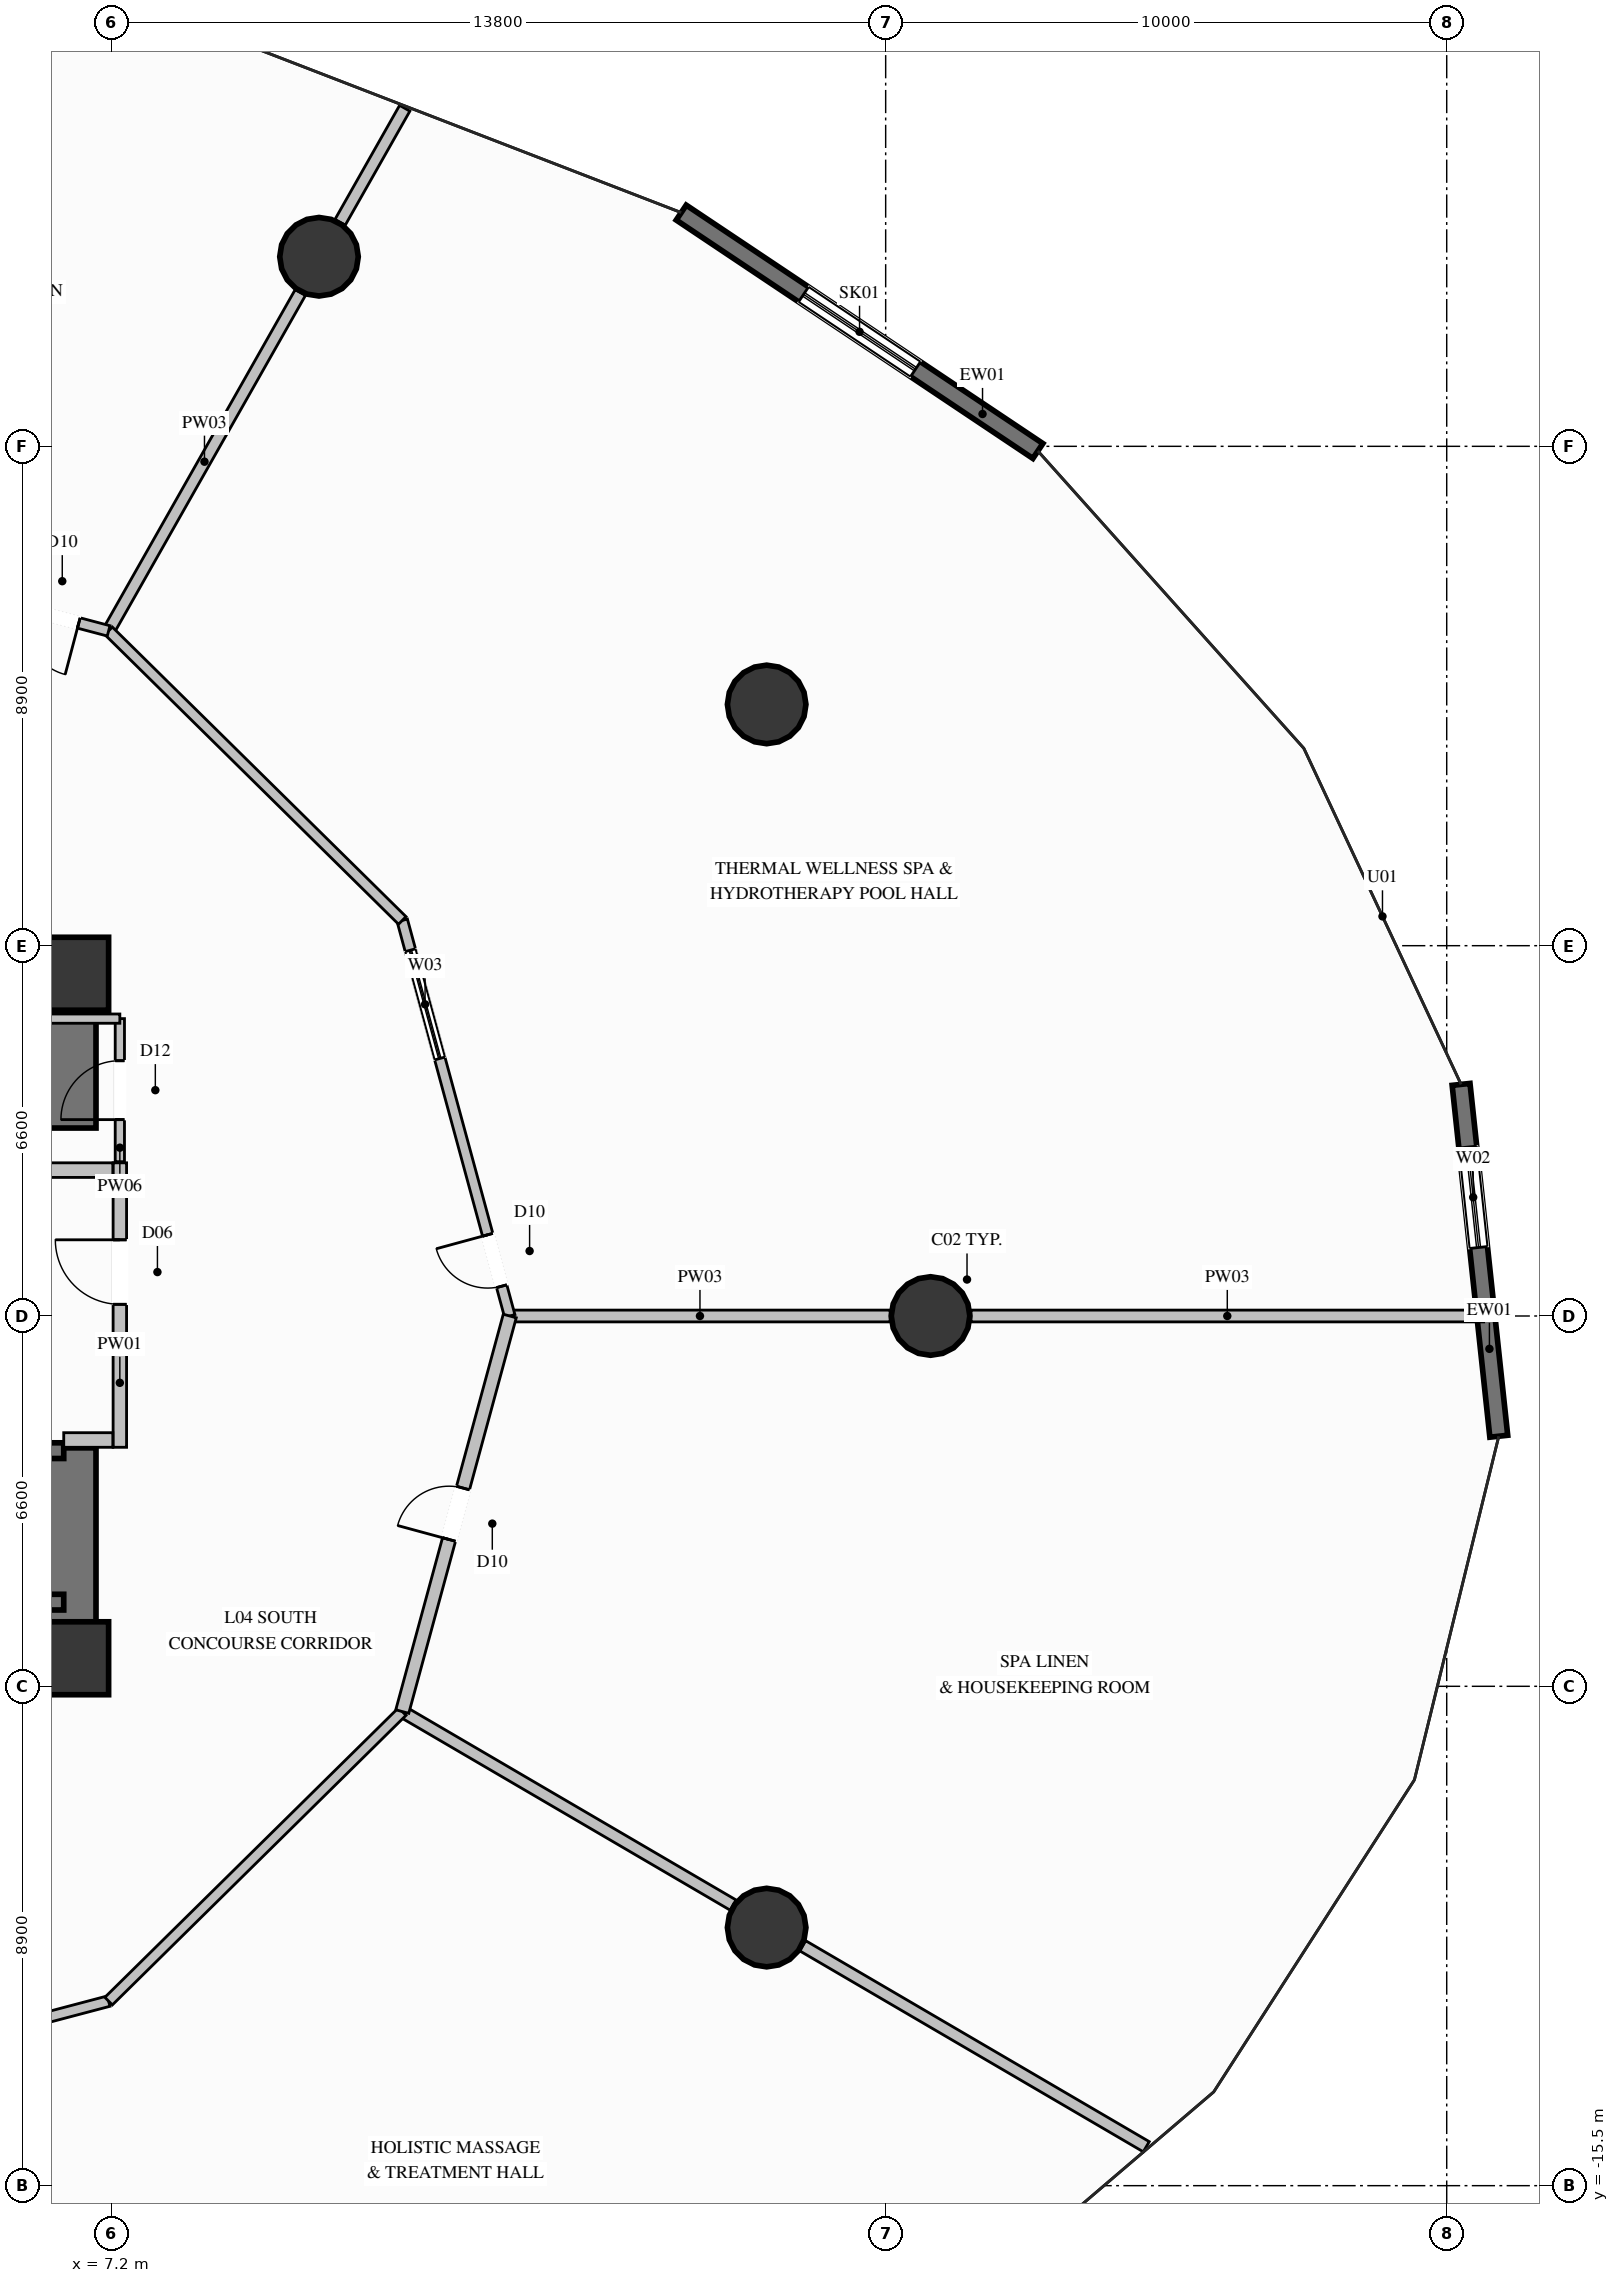
"""IFC4 building model, lengths in metres.
Left out: names, types, materials, properties, quantities, classifications, styles, units other than length and angle.
Written with IfcOpenShell. Run it as: python <this file> out.ifc"""

import sys

from ifc_helpers import new_model, si_unit, direction, frame, frame_2d, origin, origin_2d, place, context, subcontext, project, spatial, rectangle, circle, extrude, element, fill, save


model = new_model("IFC4")
c1 = context("Model", 3, precision=1e-05, world=origin(), true_north=direction((0.0, 1.0)))
c2 = subcontext(c1, "Body", "Model", "MODEL_VIEW")
j1 = project(units=[si_unit("LENGTHUNIT", "METRE"), si_unit("PLANEANGLEUNIT", "RADIAN")], contexts=[c1])
p1 = place(None, origin())
s1 = spatial("IfcSite", under=j1, at=p1, CompositionType="ELEMENT")
p2 = place(p1, origin())
s2 = spatial("IfcBuilding", under=s1, at=p2, CompositionType="ELEMENT")
p3 = place(p2, frame((0.0, 0.0, 23.6)))
s3 = spatial("IfcBuildingStorey", under=s2, at=p3, CompositionType="ELEMENT", Elevation=23.6)
for number, where, z_axis, x_axis in (
    (1, (6.5, -6.1, 0.0), (0.0, 0.0, 1.0), (1.0, 0.0, 0.0)),
    (2, (6.5, 6.1, 0.0), (0.0, 0.0, 1.0), (1.0, 0.0, 0.0)),
):
    element("IfcColumn", number, at=place(p3, frame(where, z_axis=z_axis, x_axis=x_axis)), inside=s3, PredefinedType="COLUMN", context=c2, shape_type="SweptSolid", body=[
        extrude(rectangle(XDim=1.3, YDim=1.3, at=origin_2d()), origin(), (0.0, 0.0, 1.0), 4.8),
    ])
p4 = place(p3, frame((6.5, -6.525, 0.0), z_axis=(0.0, 0.0, 1.0), x_axis=(0.0, 1.0, 0.0)))
e3 = element("IfcWall", 3, at=p4, inside=s3, PredefinedType="SHEAR", context=c2, shape_type="SweptSolid", body=[
    extrude(rectangle(XDim=4.175, YDim=0.85, at=frame_2d((2.087, 0.0))), origin(), (0.0, 0.0, 1.0), 4.8),
])
p5 = place(p3, frame((6.5, 3.35, 0.0), z_axis=(0.0, 0.0, 1.0), x_axis=(0.0, 1.0, 0.0)))
e4 = element("IfcWall", 4, at=p5, inside=s3, PredefinedType="SHEAR", context=c2, shape_type="SweptSolid", body=[
    extrude(rectangle(XDim=3.175, YDim=0.85, at=frame_2d((1.587, 0.0))), origin(), (0.0, 0.0, 1.0), 4.8),
])
for number, where, z_axis, x_axis in (
    (5, (21.8, 0.0, 0.0), (0.0, 0.0, 1.0), (1.0, 0.0, 0.0)),
    (6, (18.879, 10.9, 0.0), (0.0, 0.0, 1.0), (1.0, 0.0, 0.0)),
    (7, (10.9, 18.879, 0.0), (0.0, 0.0, 1.0), (1.0, 0.0, 0.0)),
    (8, (18.879, -10.9, 0.0), (0.0, 0.0, 1.0), (1.0, 0.0, 0.0)),
):
    element("IfcColumn", number, at=place(p3, frame(where, z_axis=z_axis, x_axis=x_axis)), inside=s3, PredefinedType="COLUMN", context=c2, shape_type="SweptSolid", body=[
        extrude(circle(Radius=0.7, at=origin_2d()), origin(), (0.0, 0.0, 1.0), 4.8),
    ])
p6 = place(p3, frame((31.256, 4.128, 0.0), z_axis=(0.0, 0.0, 1.0), x_axis=(0.106530390003, -0.994309446805, 0.0)))
e9 = element("IfcWall", 9, at=p6, inside=s3, PredefinedType="SOLIDWALL", context=c2, shape_type="SweptSolid", body=[
    extrude(rectangle(XDim=6.307, YDim=0.32, at=frame_2d((3.153, 0.0))), origin(), (0.0, 0.0, 1.0), 4.54),
])
p7 = place(p6, frame((1.124, 0.0, 0.65)))
e10 = element("IfcOpeningElement", 10, at=p7, cuts=e9, PredefinedType="OPENING", context=c2, shape_type="SweptSolid", body=[
    extrude(rectangle(XDim=1.8, YDim=2.6, at=frame_2d((0.9, 1.3))), frame((0.0, 0.17, 0.0), z_axis=(0.0, -1.0, 0.0), x_axis=(1.0, 0.0, 0.0)), (0.0, 0.0, 1.0), 0.34),
])
p8 = place(p3, frame((17.356, 19.666, 0.0), z_axis=(0.0, 0.0, 1.0), x_axis=(0.831381626456, -0.555701890577, 0.0)))
e11 = element("IfcWall", 11, at=p8, inside=s3, PredefinedType="SOLIDWALL", context=c2, shape_type="SweptSolid", body=[
    extrude(rectangle(XDim=7.646, YDim=0.32, at=frame_2d((3.823, 0.0))), origin(), (0.0, 0.0, 1.0), 4.54),
])
p9 = place(p8, frame((2.623, 0.0, 0.6)))
e12 = element("IfcOpeningElement", 12, at=p9, cuts=e11, PredefinedType="OPENING", context=c2, shape_type="SweptSolid", body=[
    extrude(rectangle(XDim=2.4, YDim=3.0, at=frame_2d((1.2, 1.5))), frame((0.0, 0.17, 0.0), z_axis=(0.0, -1.0, 0.0), x_axis=(1.0, 0.0, 0.0)), (0.0, 0.0, 1.0), 0.34),
])
p10 = place(p3, frame((4.15, -5.1, 0.0), z_axis=(0.0, 0.0, 1.0), x_axis=(1.0, 0.0, 0.0)))
e13 = element("IfcWall", 13, at=p10, inside=s3, PredefinedType="SOLIDWALL", context=c2, shape_type="SweptSolid", body=[
    extrude(rectangle(XDim=2.2, YDim=0.28, at=frame_2d((1.1, 0.0))), origin(), (0.0, 0.0, 1.0), 4.54),
])
p11 = place(p3, frame((6.35, -2.4, 0.0), z_axis=(0.0, 0.0, 1.0), x_axis=(-1.0, 0.0, 0.0)))
e14 = element("IfcWall", 14, at=p11, inside=s3, PredefinedType="SOLIDWALL", context=c2, shape_type="SweptSolid", body=[
    extrude(rectangle(XDim=2.2, YDim=0.28, at=frame_2d((1.1, 0.0))), origin(), (0.0, 0.0, 1.0), 4.54),
])
p12 = place(p11, frame((0.5, 0.0, 0.0)))
e15 = element("IfcOpeningElement", 15, at=p12, cuts=e14, PredefinedType="OPENING", context=c2, shape_type="SweptSolid", body=[
    extrude(rectangle(XDim=1.2, YDim=2.2, at=frame_2d((0.6, 1.1))), frame((0.0, 0.15, 0.0), z_axis=(0.0, -1.0, 0.0), x_axis=(1.0, 0.0, 0.0)), (0.0, 0.0, 1.0), 0.3),
])
p13 = place(p3, frame((7.35, -2.34, 0.0), z_axis=(0.0, 0.0, 1.0), x_axis=(0.0, 1.0, 0.0)))
e16 = element("IfcWall", 16, at=p13, inside=s3, PredefinedType="PARTITIONING", context=c2, shape_type="SweptSolid", body=[
    extrude(rectangle(XDim=5.07, YDim=0.24, at=frame_2d((2.535, 0.0))), origin(), (0.0, 0.0, 1.0), 2.725),
])
p14 = place(p13, frame((2.548, 0.0, 0.0)))
e17 = element("IfcOpeningElement", 17, at=p14, cuts=e16, PredefinedType="OPENING", context=c2, shape_type="SweptSolid", body=[
    extrude(rectangle(XDim=1.15, YDim=2.2, at=frame_2d((0.575, 1.1))), frame((0.0, 0.13, 0.0), z_axis=(0.0, -1.0, 0.0), x_axis=(1.0, 0.0, 0.0)), (0.0, 0.0, 1.0), 0.26),
])
p15 = place(p3, frame((6.35, -2.21, 0.0), z_axis=(0.0, 0.0, 1.0), x_axis=(1.0, 0.0, 0.0)))
e18 = element("IfcWall", 18, at=p15, inside=s3, PredefinedType="PARTITIONING", context=c2, shape_type="SweptSolid", body=[
    extrude(rectangle(XDim=0.875, YDim=0.26, at=frame_2d((0.438, 0.0))), origin(), (0.0, 0.0, 1.0), 4.54),
])
p16 = place(p3, frame((4.13, 2.6, 0.0), z_axis=(0.0, 0.0, 1.0), x_axis=(1.0, 0.0, 0.0)))
e19 = element("IfcWall", 19, at=p16, inside=s3, PredefinedType="PARTITIONING", context=c2, shape_type="SweptSolid", body=[
    extrude(rectangle(XDim=3.095, YDim=0.26, at=frame_2d((1.548, 0.0))), origin(), (0.0, 0.0, 1.0), 4.54),
])
p17 = place(p3, frame((7.35, 2.75, 0.0), z_axis=(0.0, 0.0, 1.0), x_axis=(0.0, 1.0, 0.0)))
e20 = element("IfcWall", 20, at=p17, inside=s3, PredefinedType="PARTITIONING", context=c2, shape_type="SweptSolid", body=[
    extrude(rectangle(XDim=2.55, YDim=0.165, at=frame_2d((1.275, 0.0))), origin(), (0.0, 0.0, 1.0), 2.725),
])
p18 = place(p17, frame((0.75, 0.0, 0.0)))
e21 = element("IfcOpeningElement", 21, at=p18, cuts=e20, PredefinedType="OPENING", context=c2, shape_type="SweptSolid", body=[
    extrude(rectangle(XDim=1.05, YDim=2.15, at=frame_2d((0.525, 1.075))), frame((0.0, 0.093, 0.0), z_axis=(0.0, -1.0, 0.0), x_axis=(1.0, 0.0, 0.0)), (0.0, 0.0, 1.0), 0.185),
])
p19 = place(p3, frame((7.35, 5.3, 0.0), z_axis=(0.0, 0.0, 1.0), x_axis=(-1.0, 0.0, 0.0)))
e22 = element("IfcWall", 22, at=p19, inside=s3, PredefinedType="PARTITIONING", context=c2, shape_type="SweptSolid", body=[
    extrude(rectangle(XDim=1.5, YDim=0.165, at=frame_2d((0.75, 0.0))), origin(), (0.0, 0.0, 1.0), 2.725),
])
p20 = place(p3, frame((14.3, 0.0, 0.0), z_axis=(0.0, 0.0, 1.0), x_axis=(1.0, 0.0, 0.0)))
e23 = element("IfcWall", 23, at=p20, inside=s3, PredefinedType="PARTITIONING", context=c2, shape_type="SweptSolid", body=[
    extrude(rectangle(XDim=6.78, YDim=0.21, at=frame_2d((3.39, 0.0))), origin(), (0.0, 0.0, 1.0), 2.725),
])
p21 = place(p3, frame((22.52, 0.0, 0.0), z_axis=(0.0, 0.0, 1.0), x_axis=(1.0, 0.0, 0.0)))
e24 = element("IfcWall", 24, at=p21, inside=s3, PredefinedType="PARTITIONING", context=c2, shape_type="SweptSolid", body=[
    extrude(rectangle(XDim=9.138, YDim=0.21, at=frame_2d((4.569, 0.0))), origin(), (0.0, 0.0, 1.0), 4.54),
])
p22 = place(p3, frame((7.15, 12.211, 0.0), z_axis=(0.0, 0.0, 1.0), x_axis=(0.493009905658, 0.87002369676, 0.0)))
e25 = element("IfcWall", 25, at=p22, inside=s3, PredefinedType="PARTITIONING", context=c2, shape_type="SweptSolid", body=[
    extrude(rectangle(XDim=6.931, YDim=0.21, at=frame_2d((3.465, 0.0))), origin(), (0.0, 0.0, 1.0), 2.725),
])
p23 = place(p3, frame((11.276, 19.493, 0.0), z_axis=(0.0, 0.0, 1.0), x_axis=(0.493041569547, 0.870005753256, 0.0)))
e26 = element("IfcWall", 26, at=p23, inside=s3, PredefinedType="PARTITIONING", context=c2, shape_type="SweptSolid", body=[
    extrude(rectangle(XDim=2.337, YDim=0.21, at=frame_2d((1.168, 0.0))), origin(), (0.0, 0.0, 1.0), 4.54),
])
p24 = place(p3, frame((12.384, -7.05, 0.0), z_axis=(0.0, 0.0, 1.0), x_axis=(0.863200238908, -0.504861711313, 0.0)))
e27 = element("IfcWall", 27, at=p24, inside=s3, PredefinedType="PARTITIONING", context=c2, shape_type="SweptSolid", body=[
    extrude(rectangle(XDim=6.832, YDim=0.21, at=frame_2d((3.416, 0.0))), origin(), (0.0, 0.0, 1.0), 2.725),
])
p25 = place(p3, frame((19.522, -11.225, 0.0), z_axis=(0.0, 0.0, 1.0), x_axis=(0.863224110389, -0.504820894222, 0.0)))
e28 = element("IfcWall", 28, at=p25, inside=s3, PredefinedType="PARTITIONING", context=c2, shape_type="SweptSolid", body=[
    extrude(rectangle(XDim=7.093, YDim=0.21, at=frame_2d((3.547, 0.0))), origin(), (0.0, 0.0, 1.0), 4.54),
])
p26 = place(p3, frame((14.3, 0.0, 0.0), z_axis=(0.0, 0.0, 1.0), x_axis=(-0.262260528785, 0.964997106235, 0.0)))
e29 = element("IfcWall", 29, at=p26, inside=s3, PredefinedType="PARTITIONING", context=c2, shape_type="SweptSolid", body=[
    extrude(rectangle(XDim=7.306, YDim=0.19, at=frame_2d((3.653, 0.0))), origin(), (0.0, 0.0, 1.0), 4.54),
])
p27 = place(p26, frame((0.55, 0.0, 0.0)))
e30 = element("IfcOpeningElement", 30, at=p27, cuts=e29, PredefinedType="OPENING", context=c2, shape_type="SweptSolid", body=[
    extrude(rectangle(XDim=0.95, YDim=2.1, at=frame_2d((0.475, 1.05))), frame((0.0, 0.105, 0.0), z_axis=(0.0, -1.0, 0.0), x_axis=(1.0, 0.0, 0.0)), (0.0, 0.0, 1.0), 0.21),
])
p28 = place(p26, frame((4.756, 0.0, 0.9)))
e31 = element("IfcOpeningElement", 31, at=p28, cuts=e29, PredefinedType="OPENING", context=c2, shape_type="SweptSolid", body=[
    extrude(rectangle(XDim=2.0, YDim=1.6, at=frame_2d((1.0, 0.8))), frame((0.0, 0.105, 0.0), z_axis=(0.0, -1.0, 0.0), x_axis=(1.0, 0.0, 0.0)), (0.0, 0.0, 1.0), 0.21),
])
p29 = place(p3, frame((12.384, 7.05, 0.0), z_axis=(0.0, 0.0, 1.0), x_axis=(-0.712071304345, 0.702107155303, 0.0)))
e32 = element("IfcWall", 32, at=p29, inside=s3, PredefinedType="PARTITIONING", context=c2, shape_type="SweptSolid", body=[
    extrude(rectangle(XDim=7.351, YDim=0.19, at=frame_2d((3.675, 0.0))), origin(), (0.0, 0.0, 1.0), 4.54),
])
p30 = place(p3, frame((7.15, 12.211, 0.0), z_axis=(0.0, 0.0, 1.0), x_axis=(-0.966820901533, 0.255455170937, 0.0)))
e33 = element("IfcWall", 33, at=p30, inside=s3, PredefinedType="PARTITIONING", context=c2, shape_type="SweptSolid", body=[
    extrude(rectangle(XDim=7.395, YDim=0.19, at=frame_2d((3.698, 0.0))), origin(), (0.0, 0.0, 1.0), 4.54),
])
p31 = place(p30, frame((0.55, 0.0, 0.0)))
e34 = element("IfcOpeningElement", 34, at=p31, cuts=e33, PredefinedType="OPENING", context=c2, shape_type="SweptSolid", body=[
    extrude(rectangle(XDim=0.95, YDim=2.1, at=frame_2d((0.475, 1.05))), frame((0.0, 0.105, 0.0), z_axis=(0.0, -1.0, 0.0), x_axis=(1.0, 0.0, 0.0)), (0.0, 0.0, 1.0), 0.21),
])
p32 = place(p30, frame((4.845, 0.0, 0.9)))
e35 = element("IfcOpeningElement", 35, at=p32, cuts=e33, PredefinedType="OPENING", context=c2, shape_type="SweptSolid", body=[
    extrude(rectangle(XDim=2.0, YDim=1.6, at=frame_2d((1.0, 0.8))), frame((0.0, 0.105, 0.0), z_axis=(0.0, -1.0, 0.0), x_axis=(1.0, 0.0, 0.0)), (0.0, 0.0, 1.0), 0.21),
])
p33 = place(p3, frame((0.0, -14.1, 0.0), z_axis=(0.0, 0.0, 1.0), x_axis=(0.966820901533, 0.255455170937, 0.0)))
e36 = element("IfcWall", 36, at=p33, inside=s3, PredefinedType="PARTITIONING", context=c2, shape_type="SweptSolid", body=[
    extrude(rectangle(XDim=7.395, YDim=0.19, at=frame_2d((3.698, 0.0))), origin(), (0.0, 0.0, 1.0), 4.54),
])
p34 = place(p3, frame((7.15, -12.211, 0.0), z_axis=(0.0, 0.0, 1.0), x_axis=(0.712071304345, 0.702107155303, 0.0)))
e37 = element("IfcWall", 37, at=p34, inside=s3, PredefinedType="PARTITIONING", context=c2, shape_type="SweptSolid", body=[
    extrude(rectangle(XDim=7.351, YDim=0.19, at=frame_2d((3.675, 0.0))), origin(), (0.0, 0.0, 1.0), 4.54),
])
p35 = place(p3, frame((12.384, -7.05, 0.0), z_axis=(0.0, 0.0, 1.0), x_axis=(0.262260528785, 0.964997106235, 0.0)))
e38 = element("IfcWall", 38, at=p35, inside=s3, PredefinedType="PARTITIONING", context=c2, shape_type="SweptSolid", body=[
    extrude(rectangle(XDim=7.306, YDim=0.24, at=frame_2d((3.653, 0.0))), origin(), (0.0, 0.0, 1.0), 4.54),
])
p36 = place(p35, frame((3.178, 0.0, 0.0)))
e39 = element("IfcOpeningElement", 39, at=p36, cuts=e38, PredefinedType="OPENING", context=c2, shape_type="SweptSolid", body=[
    extrude(rectangle(XDim=0.95, YDim=2.1, at=frame_2d((0.475, 1.05))), frame((0.0, 0.13, 0.0), z_axis=(0.0, -1.0, 0.0), x_axis=(1.0, 0.0, 0.0)), (0.0, 0.0, 1.0), 0.26),
])
p37 = place(p7, origin())
e40 = element("IfcWindow", 40, at=p37, inside=s3, PartitioningType="SINGLE_PANEL", PredefinedType="WINDOW", context=c2, shape_type="SweptSolid", body=[
    extrude(rectangle(XDim=1.8, YDim=2.6, at=frame_2d((0.9, 1.3))), frame((0.0, 0.03, 0.0), z_axis=(0.0, -1.0, 0.0), x_axis=(1.0, 0.0, 0.0)), (0.0, 0.0, 1.0), 0.06),
])
fill(e10, e40)
p38 = place(p9, origin())
e41 = element("IfcWindow", 41, at=p38, inside=s3, PartitioningType="SINGLE_PANEL", PredefinedType="SKYLIGHT", context=c2, shape_type="SweptSolid", body=[
    extrude(rectangle(XDim=2.4, YDim=3.0, at=frame_2d((1.2, 1.5))), frame((0.0, 0.03, 0.0), z_axis=(0.0, -1.0, 0.0), x_axis=(1.0, 0.0, 0.0)), (0.0, 0.0, 1.0), 0.06),
])
fill(e12, e41)
p39 = place(p14, origin())
e42 = element("IfcDoor", 42, at=p39, inside=s3, OperationType="SINGLE_SWING_RIGHT", PredefinedType="DOOR", context=c2, shape_type="SweptSolid", body=[
    extrude(rectangle(XDim=1.15, YDim=2.2, at=frame_2d((0.575, 1.1))), frame((0.0, 0.025, 0.0), z_axis=(0.0, -1.0, 0.0), x_axis=(1.0, 0.0, 0.0)), (0.0, 0.0, 1.0), 0.05),
])
fill(e17, e42)
p40 = place(p18, origin())
e43 = element("IfcDoor", 43, at=p40, inside=s3, OperationType="SINGLE_SWING_LEFT", PredefinedType="DOOR", context=c2, shape_type="SweptSolid", body=[
    extrude(rectangle(XDim=1.05, YDim=2.15, at=frame_2d((0.525, 1.075))), frame((0.0, 0.025, 0.0), z_axis=(0.0, -1.0, 0.0), x_axis=(1.0, 0.0, 0.0)), (0.0, 0.0, 1.0), 0.05),
])
fill(e21, e43)
p41 = place(p27, origin())
e44 = element("IfcDoor", 44, at=p41, inside=s3, OperationType="SINGLE_SWING_RIGHT", PredefinedType="DOOR", context=c2, shape_type="SweptSolid", body=[
    extrude(rectangle(XDim=0.95, YDim=2.1, at=frame_2d((0.475, 1.05))), frame((0.0, 0.025, 0.0), z_axis=(0.0, -1.0, 0.0), x_axis=(1.0, 0.0, 0.0)), (0.0, 0.0, 1.0), 0.05),
])
fill(e30, e44)
p42 = place(p28, origin())
e45 = element("IfcWindow", 45, at=p42, inside=s3, PartitioningType="SINGLE_PANEL", PredefinedType="WINDOW", context=c2, shape_type="SweptSolid", body=[
    extrude(rectangle(XDim=2.0, YDim=1.6, at=frame_2d((1.0, 0.8))), frame((0.0, 0.03, 0.0), z_axis=(0.0, -1.0, 0.0), x_axis=(1.0, 0.0, 0.0)), (0.0, 0.0, 1.0), 0.06),
])
fill(e31, e45)
p43 = place(p31, origin())
e46 = element("IfcDoor", 46, at=p43, inside=s3, OperationType="SINGLE_SWING_LEFT", PredefinedType="DOOR", context=c2, shape_type="SweptSolid", body=[
    extrude(rectangle(XDim=0.95, YDim=2.1, at=frame_2d((0.475, 1.05))), frame((0.0, 0.025, 0.0), z_axis=(0.0, -1.0, 0.0), x_axis=(1.0, 0.0, 0.0)), (0.0, 0.0, 1.0), 0.05),
])
fill(e34, e46)
p44 = place(p36, origin())
e47 = element("IfcDoor", 47, at=p44, inside=s3, OperationType="SINGLE_SWING_LEFT", PredefinedType="DOOR", context=c2, shape_type="SweptSolid", body=[
    extrude(rectangle(XDim=0.95, YDim=2.1, at=frame_2d((0.475, 1.05))), frame((0.0, 0.025, 0.0), z_axis=(0.0, -1.0, 0.0), x_axis=(1.0, 0.0, 0.0)), (0.0, 0.0, 1.0), 0.05),
])
fill(e39, e47)
save(model, sys.argv[1])
